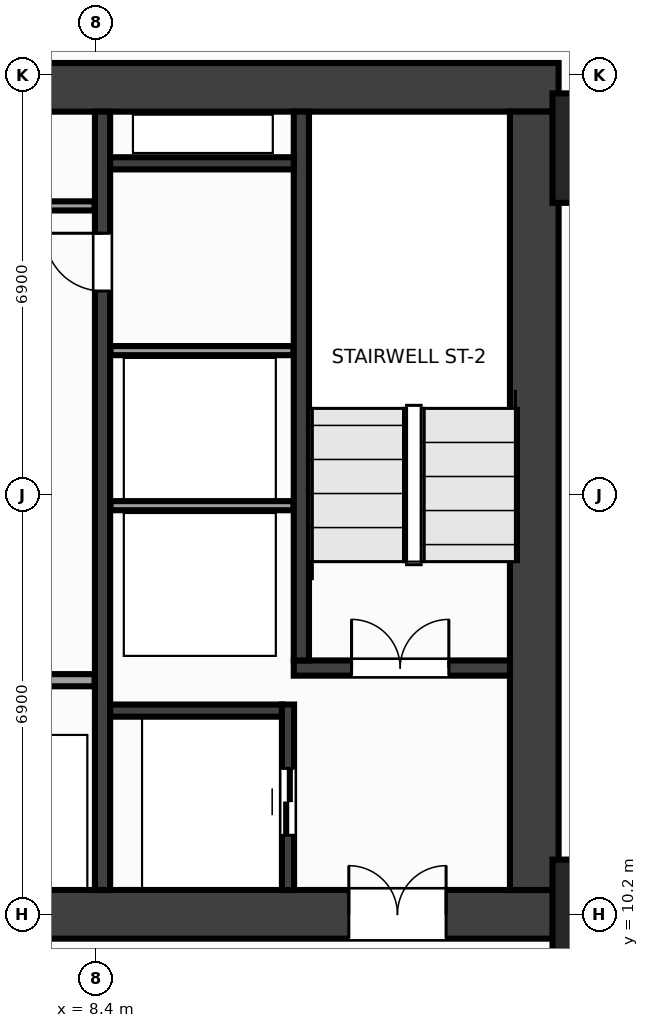
"""IFC4 building model, lengths in metres.
Left out: names, types, materials, properties, quantities, classifications, styles, units other than length and angle.
Written with IfcOpenShell. Run it as: python <this file> out.ifc"""

import sys

from ifc_helpers import new_model, si_unit, direction, frame, frame_2d, origin, origin_2d, place, context, subcontext, project, spatial, rectangle, extrude, source, transform, mapped, element, fill, save


model = new_model("IFC4")
c1 = context("Model", 3, precision=1e-05, world=origin(), true_north=direction((0.0, 1.0)))
c2 = subcontext(c1, "Body", "Model", "MODEL_VIEW")
j1 = project(units=[si_unit("LENGTHUNIT", "METRE"), si_unit("PLANEANGLEUNIT", "RADIAN")], contexts=[c1])
p1 = place(None, origin())
s1 = spatial("IfcSite", under=j1, at=p1, CompositionType="ELEMENT")
p2 = place(p1, origin())
s2 = spatial("IfcBuilding", under=s1, at=p2, CompositionType="ELEMENT")
p3 = place(p2, frame((0.0, 0.0, 59.6)))
s3 = spatial("IfcBuildingStorey", under=s2, at=p3, CompositionType="ELEMENT", Elevation=59.6)
m1 = source(origin(), c2, "Body", "SweptSolid", [
    extrude(rectangle(XDim=32.0, YDim=0.8, at=frame_2d((16.0, 0.0))), origin(), (0.0, 0.0, 1.0), 3.6),
])
p4 = place(p3, frame((-16.0, 23.8, 0.0), z_axis=(0.0, 0.0, 1.0), x_axis=(1.0, 0.0, 0.0)))
e1 = element("IfcWall", 1, at=p4, inside=s3, PredefinedType="SHEAR", context=c2, shape_type="MappedRepresentation", body=[
    mapped(m1, transform((0.0, 0.0, 0.0), x_axis=(1.0, 0.0, 0.0), y_axis=(0.0, 1.0, 0.0), z_axis=(0.0, 0.0, 1.0), scale=1.0)),
])
p5 = place(p3, frame((-16.0, 10.2, 0.0), z_axis=(0.0, 0.0, 1.0), x_axis=(1.0, 0.0, 0.0)))
e2 = element("IfcWall", 2, at=p5, inside=s3, PredefinedType="SHEAR", context=c2, shape_type="MappedRepresentation", body=[
    mapped(m1, transform((0.0, 0.0, 0.0), x_axis=(1.0, 0.0, 0.0), y_axis=(0.0, 1.0, 0.0), z_axis=(0.0, 0.0, 1.0), scale=1.0)),
])
p6 = place(p5, frame((1.85, 0.0, 0.0)))
e3 = element("IfcOpeningElement", 3, at=p6, cuts=e2, PredefinedType="OPENING", context=c2, shape_type="SweptSolid", body=[
    extrude(rectangle(XDim=1.6, YDim=2.15, at=frame_2d((0.8, 1.075))), frame((0.0, 0.412, 0.0), z_axis=(0.0, -1.0, 0.0), x_axis=(1.0, 0.0, 0.0)), (0.0, 0.0, 1.0), 0.824),
])
p7 = place(p5, frame((28.55, 0.0, 0.0)))
e4 = element("IfcOpeningElement", 4, at=p7, cuts=e2, PredefinedType="OPENING", context=c2, shape_type="SweptSolid", body=[
    extrude(rectangle(XDim=1.6, YDim=2.15, at=frame_2d((0.8, 1.075))), frame((0.0, 0.412, 0.0), z_axis=(0.0, -1.0, 0.0), x_axis=(1.0, 0.0, 0.0)), (0.0, 0.0, 1.0), 0.824),
])
p8 = place(p5, frame((15.25, 0.0, 0.0)))
e5 = element("IfcOpeningElement", 5, at=p8, cuts=e2, PredefinedType="OPENING", context=c2, shape_type="SweptSolid", body=[
    extrude(rectangle(XDim=1.5, YDim=2.2, at=frame_2d((0.75, 1.1))), frame((0.0, 0.412, 0.0), z_axis=(0.0, -1.0, 0.0), x_axis=(1.0, 0.0, 0.0)), (0.0, 0.0, 1.0), 0.824),
])
m2 = source(origin(), c2, "Body", "SweptSolid", [
    extrude(rectangle(XDim=12.8, YDim=0.8, at=frame_2d((6.4, 0.0))), origin(), (0.0, 0.0, 1.0), 3.6),
])
p9 = place(p3, frame((15.6, 10.6, 0.0), z_axis=(0.0, 0.0, 1.0), x_axis=(0.0, 1.0, 0.0)))
e6 = element("IfcWall", 6, at=p9, inside=s3, PredefinedType="SHEAR", context=c2, shape_type="MappedRepresentation", body=[
    mapped(m2, transform((0.0, 0.0, 0.0), x_axis=(1.0, 0.0, 0.0), y_axis=(0.0, 1.0, 0.0), z_axis=(0.0, 0.0, 1.0), scale=1.0)),
])
m3 = source(origin(), c2, "Body", "SweptSolid", [
    extrude(rectangle(XDim=12.8, YDim=0.25, at=frame_2d((6.4, 0.0))), origin(), (0.0, 0.0, 1.0), 3.6),
])
p10 = place(p3, frame((8.5, 10.6, 0.0), z_axis=(0.0, 0.0, 1.0), x_axis=(0.0, 1.0, 0.0)))
e7 = element("IfcWall", 7, at=p10, inside=s3, PredefinedType="SHEAR", context=c2, shape_type="MappedRepresentation", body=[
    mapped(m3, transform((0.0, 0.0, 0.0), x_axis=(1.0, 0.0, 0.0), y_axis=(0.0, 1.0, 0.0), z_axis=(0.0, 0.0, 1.0), scale=1.0)),
])
p11 = place(p10, frame((9.85, 0.0, 0.0)))
e8 = element("IfcOpeningElement", 8, at=p11, cuts=e7, PredefinedType="OPENING", context=c2, shape_type="SweptSolid", body=[
    extrude(rectangle(XDim=0.95, YDim=2.15, at=frame_2d((0.475, 1.075))), frame((0.0, 0.137, 0.0), z_axis=(0.0, -1.0, 0.0), x_axis=(1.0, 0.0, 0.0)), (0.0, 0.0, 1.0), 0.274),
])
m4 = source(origin(), c2, "Body", "SweptSolid", [
    extrude(rectangle(XDim=3.555, YDim=0.25, at=frame_2d((1.777, 0.0))), origin(), (0.0, 0.0, 1.0), 3.6),
])
p12 = place(p3, frame((11.645, 14.25, 0.0), z_axis=(0.0, 0.0, 1.0), x_axis=(1.0, 0.0, 0.0)))
e9 = element("IfcWall", 9, at=p12, inside=s3, PredefinedType="SHEAR", context=c2, shape_type="MappedRepresentation", body=[
    mapped(m4, transform((0.0, 0.0, 0.0), x_axis=(1.0, 0.0, 0.0), y_axis=(0.0, 1.0, 0.0), z_axis=(0.0, 0.0, 1.0), scale=1.0)),
])
p13 = place(p12, frame((0.95, 0.0, 0.0)))
e10 = element("IfcOpeningElement", 10, at=p13, cuts=e9, PredefinedType="OPENING", context=c2, shape_type="SweptSolid", body=[
    extrude(rectangle(XDim=1.6, YDim=2.15, at=frame_2d((0.8, 1.075))), frame((0.0, 0.137, 0.0), z_axis=(0.0, -1.0, 0.0), x_axis=(1.0, 0.0, 0.0)), (0.0, 0.0, 1.0), 0.274),
])
m5 = source(origin(), c2, "Body", "SweptSolid", [
    extrude(rectangle(XDim=9.025, YDim=0.25, at=frame_2d((4.512, 0.0))), origin(), (0.0, 0.0, 1.0), 3.6),
])
p14 = place(p3, frame((11.77, 14.375, 0.0), z_axis=(0.0, 0.0, 1.0), x_axis=(0.0, 1.0, 0.0)))
e11 = element("IfcWall", 11, at=p14, inside=s3, PredefinedType="SHEAR", context=c2, shape_type="MappedRepresentation", body=[
    mapped(m5, transform((0.0, 0.0, 0.0), x_axis=(1.0, 0.0, 0.0), y_axis=(0.0, 1.0, 0.0), z_axis=(0.0, 0.0, 1.0), scale=1.0)),
])
m6 = source(origin(), c2, "Body", "SweptSolid", [
    extrude(rectangle(XDim=3.05, YDim=0.2, at=frame_2d((1.525, 0.0))), origin(), (0.0, 0.0, 1.0), 3.6),
])
p15 = place(p3, frame((11.55, 10.6, 0.0), z_axis=(0.0, 0.0, 1.0), x_axis=(0.0, 1.0, 0.0)))
e12 = element("IfcWall", 12, at=p15, inside=s3, PredefinedType="SHEAR", context=c2, shape_type="MappedRepresentation", body=[
    mapped(m6, transform((0.0, 0.0, 0.0), x_axis=(1.0, 0.0, 0.0), y_axis=(0.0, 1.0, 0.0), z_axis=(0.0, 0.0, 1.0), scale=1.0)),
])
p16 = place(p15, frame((0.9, 0.0, 0.0)))
e13 = element("IfcOpeningElement", 13, at=p16, cuts=e12, PredefinedType="OPENING", context=c2, shape_type="SweptSolid", body=[
    extrude(rectangle(XDim=1.1, YDim=2.15, at=frame_2d((0.55, 1.075))), frame((0.0, 0.112, 0.0), z_axis=(0.0, -1.0, 0.0), x_axis=(1.0, 0.0, 0.0)), (0.0, 0.0, 1.0), 0.224),
])
m7 = source(origin(), c2, "Body", "SweptSolid", [
    extrude(rectangle(XDim=2.825, YDim=0.2, at=frame_2d((1.413, 0.0))), origin(), (0.0, 0.0, 1.0), 3.6),
])
p17 = place(p3, frame((8.625, 13.55, 0.0), z_axis=(0.0, 0.0, 1.0), x_axis=(1.0, 0.0, 0.0)))
e14 = element("IfcWall", 14, at=p17, inside=s3, PredefinedType="SHEAR", context=c2, shape_type="MappedRepresentation", body=[
    mapped(m7, transform((0.0, 0.0, 0.0), x_axis=(1.0, 0.0, 0.0), y_axis=(0.0, 1.0, 0.0), z_axis=(0.0, 0.0, 1.0), scale=1.0)),
])
m8 = source(origin(), c2, "Body", "SweptSolid", [
    extrude(rectangle(XDim=3.02, YDim=0.2, at=frame_2d((1.51, 0.0))), origin(), (0.0, 0.0, 1.0), 3.6),
])
p18 = place(p3, frame((8.625, 22.55, 0.0), z_axis=(0.0, 0.0, 1.0), x_axis=(1.0, 0.0, 0.0)))
e15 = element("IfcWall", 15, at=p18, inside=s3, PredefinedType="SHEAR", context=c2, shape_type="MappedRepresentation", body=[
    mapped(m8, transform((0.0, 0.0, 0.0), x_axis=(1.0, 0.0, 0.0), y_axis=(0.0, 1.0, 0.0), z_axis=(0.0, 0.0, 1.0), scale=1.0)),
])
m9 = source(origin(), c2, "Body", "SweptSolid", [
    extrude(rectangle(XDim=1.8, YDim=1.8, at=origin_2d()), origin(), (0.0, 0.0, 1.0), 3.6),
])
for number, where, z_axis, x_axis in (
    (16, (16.8, 10.2, 0.0), (0.0, 0.0, 1.0), (1.0, 0.0, 0.0)),
    (17, (16.8, 22.8, 0.0), (0.0, 0.0, 1.0), (1.0, 0.0, 0.0)),
):
    element("IfcColumn", number, at=place(p3, frame(where, z_axis=z_axis, x_axis=x_axis)), inside=s3, PredefinedType="COLUMN", context=c2, shape_type="MappedRepresentation", body=[
        mapped(m9, transform((0.0, 0.0, 0.0), x_axis=(1.0, 0.0, 0.0), y_axis=(0.0, 1.0, 0.0), z_axis=(0.0, 0.0, 1.0), scale=1.0)),
    ])
m10 = source(origin(), c2, "Body", "SweptSolid", [
    extrude(rectangle(XDim=3.01, YDim=0.15, at=frame_2d((1.505, 0.0))), origin(), (0.0, 0.0, 1.0), 3.36),
])
for number, where, z_axis, x_axis in (
    (18, (8.63, 16.92, 0.0), (0.0, 0.0, 1.0), (1.0, 0.0, 0.0)),
    (19, (8.63, 19.47, 0.0), (0.0, 0.0, 1.0), (1.0, 0.0, 0.0)),
):
    element("IfcWall", number, at=place(p3, frame(where, z_axis=z_axis, x_axis=x_axis)), inside=s3, PredefinedType="PARTITIONING", context=c2, shape_type="MappedRepresentation", body=[
        mapped(m10, transform((0.0, 0.0, 0.0), x_axis=(1.0, 0.0, 0.0), y_axis=(0.0, 1.0, 0.0), z_axis=(0.0, 0.0, 1.0), scale=1.0)),
    ])
m11 = source(origin(), c2, "Body", "SweptSolid", [
    extrude(rectangle(XDim=7.07, YDim=0.2, at=frame_2d((3.535, 0.0))), origin(), (0.0, 0.0, 1.0), 3.36),
])
p19 = place(p3, frame((1.3, 14.05, 0.0), z_axis=(0.0, 0.0, 1.0), x_axis=(1.0, 0.0, 0.0)))
e20 = element("IfcWall", 20, at=p19, inside=s3, PredefinedType="PARTITIONING", context=c2, shape_type="MappedRepresentation", body=[
    mapped(m11, transform((0.0, 0.0, 0.0), x_axis=(1.0, 0.0, 0.0), y_axis=(0.0, 1.0, 0.0), z_axis=(0.0, 0.0, 1.0), scale=1.0)),
])
m12 = source(origin(), c2, "Body", "SweptSolid", [
    extrude(rectangle(XDim=2.07, YDim=0.15, at=frame_2d((1.035, 0.0))), origin(), (0.0, 0.0, 1.0), 3.36),
])
p20 = place(p3, frame((6.3, 21.85, 0.0), z_axis=(0.0, 0.0, 1.0), x_axis=(1.0, 0.0, 0.0)))
e21 = element("IfcWall", 21, at=p20, inside=s3, PredefinedType="PARTITIONING", context=c2, shape_type="MappedRepresentation", body=[
    mapped(m12, transform((0.0, 0.0, 0.0), x_axis=(1.0, 0.0, 0.0), y_axis=(0.0, 1.0, 0.0), z_axis=(0.0, 0.0, 1.0), scale=1.0)),
])
m13 = source(origin(), c2, "Body", "SweptSolid", [
    extrude(rectangle(XDim=1.6, YDim=2.15, at=frame_2d((0.8, 1.075))), frame((0.0, 0.025, 0.0), z_axis=(0.0, -1.0, 0.0), x_axis=(1.0, 0.0, 0.0)), (0.0, 0.0, 1.0), 0.05),
])
p21 = place(p13, origin())
e22 = element("IfcDoor", 22, at=p21, inside=s3, OperationType="DOUBLE_DOOR_SINGLE_SWING", PredefinedType="DOOR", context=c2, shape_type="MappedRepresentation", body=[
    mapped(m13, transform((0.0, 0.0, 0.0), x_axis=(1.0, 0.0, 0.0), y_axis=(0.0, 1.0, 0.0), z_axis=(0.0, 0.0, 1.0), scale=1.0)),
])
fill(e10, e22)
p22 = place(p7, origin())
e23 = element("IfcDoor", 23, at=p22, inside=s3, OperationType="DOUBLE_DOOR_SINGLE_SWING", PredefinedType="DOOR", context=c2, shape_type="MappedRepresentation", body=[
    mapped(m13, transform((0.0, 0.0, 0.0), x_axis=(1.0, 0.0, 0.0), y_axis=(0.0, 1.0, 0.0), z_axis=(0.0, 0.0, 1.0), scale=1.0)),
])
fill(e4, e23)
m14 = source(origin(), c2, "Body", "SweptSolid", [
    extrude(rectangle(XDim=1.1, YDim=2.15, at=frame_2d((0.55, 1.075))), frame((0.0, 0.025, 0.0), z_axis=(0.0, -1.0, 0.0), x_axis=(1.0, 0.0, 0.0)), (0.0, 0.0, 1.0), 0.05),
])
p23 = place(p16, origin())
e24 = element("IfcDoor", 24, at=p23, inside=s3, OperationType="DOUBLE_DOOR_SLIDING", PredefinedType="DOOR", context=c2, shape_type="MappedRepresentation", body=[
    mapped(m14, transform((0.0, 0.0, 0.0), x_axis=(1.0, 0.0, 0.0), y_axis=(0.0, 1.0, 0.0), z_axis=(0.0, 0.0, 1.0), scale=1.0)),
])
fill(e13, e24)
m15 = source(origin(), c2, "Body", "SweptSolid", [
    extrude(rectangle(XDim=0.95, YDim=2.15, at=frame_2d((0.475, 1.075))), frame((0.0, 0.025, 0.0), z_axis=(0.0, -1.0, 0.0), x_axis=(1.0, 0.0, 0.0)), (0.0, 0.0, 1.0), 0.05),
])
p24 = place(p11, origin())
e25 = element("IfcDoor", 25, at=p24, inside=s3, OperationType="SINGLE_SWING_RIGHT", PredefinedType="DOOR", context=c2, shape_type="MappedRepresentation", body=[
    mapped(m15, transform((0.0, 0.0, 0.0), x_axis=(1.0, 0.0, 0.0), y_axis=(0.0, 1.0, 0.0), z_axis=(0.0, 0.0, 1.0), scale=1.0)),
])
fill(e8, e25)
save(model, sys.argv[1])
